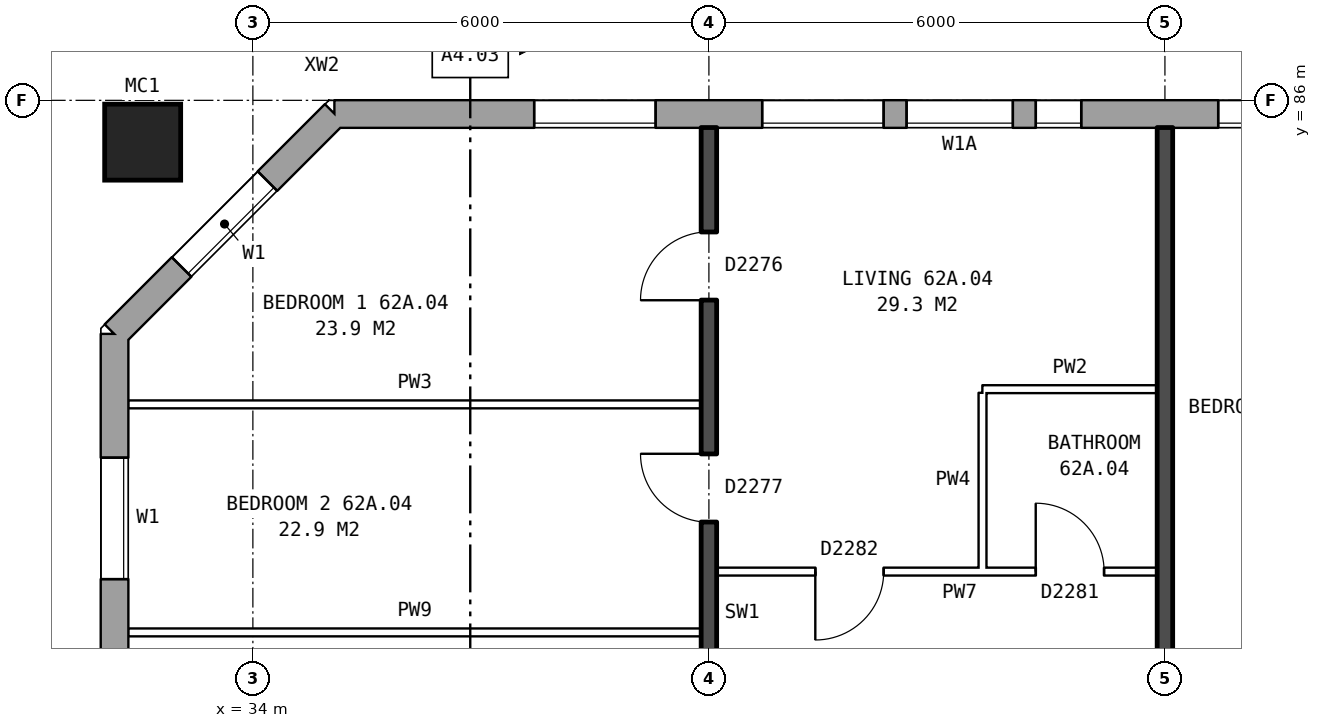
"""IFC4 building model, lengths in metres.
Left out: names, types, materials, properties, quantities, classifications, styles, units other than length and angle.
Written with IfcOpenShell. Run it as: python <this file> out.ifc"""

import sys

from ifc_helpers import new_model, si_unit, direction, frame, frame_2d, origin, origin_2d, place, context, subcontext, project, spatial, rectangle, hollow_rectangle, extrude, element, fill, save


model = new_model("IFC4")
c1 = context("Model", 3, precision=1e-05, world=origin(), true_north=direction((0.0, 1.0)))
c2 = subcontext(c1, "Body", "Model", "MODEL_VIEW")
j1 = project(units=[si_unit("LENGTHUNIT", "METRE"), si_unit("PLANEANGLEUNIT", "RADIAN")], contexts=[c1])
p1 = place(None, origin())
s1 = spatial("IfcSite", under=j1, at=p1, CompositionType="ELEMENT")
p2 = place(p1, origin())
s2 = spatial("IfcBuilding", under=s1, at=p2, CompositionType="ELEMENT")
p3 = place(p2, frame((0.0, 0.0, 221.4)))
s3 = spatial("IfcBuildingStorey", under=s2, at=p3, CompositionType="ELEMENT", Elevation=221.4)
p4 = place(p3, frame((32.55, 85.45, 0.0), z_axis=(0.0, 0.0, 1.0), x_axis=(1.0, 0.0, 0.0)))
e1 = element("IfcColumn", 1, at=p4, inside=s3, PredefinedType="COLUMN", context=c2, shape_type="SweptSolid", body=[
    extrude(hollow_rectangle(XDim=1.0, YDim=1.0, WallThickness=0.055, at=origin_2d()), origin(), (0.0, 0.0, 1.0), 3.1),
])
p5 = place(p3, frame((74.95, 85.82, 0.0), z_axis=(0.0, 0.0, 1.0), x_axis=(-1.0, 0.0, 0.0)))
e2 = element("IfcWall", 2, at=p5, inside=s3, PredefinedType="STANDARD", context=c2, shape_type="SweptSolid", body=[
    extrude(rectangle(XDim=39.875, YDim=0.36, at=frame_2d((19.938, 0.0))), origin(), (0.0, 0.0, 1.0), 2.85),
])
p6 = place(p5, frame((2.65, 0.0, 0.8)))
e3 = element("IfcOpeningElement", 3, at=p6, cuts=e2, PredefinedType="OPENING", context=c2, shape_type="SweptSolid", body=[
    extrude(rectangle(XDim=1.6, YDim=1.8, at=frame_2d((0.8, 0.9))), frame((0.0, 0.19, 0.0), z_axis=(0.0, -1.0, 0.0), x_axis=(1.0, 0.0, 0.0)), (0.0, 0.0, 1.0), 0.38),
])
p7 = place(p5, frame((5.65, 0.0, 0.8)))
e4 = element("IfcOpeningElement", 4, at=p7, cuts=e2, PredefinedType="OPENING", context=c2, shape_type="SweptSolid", body=[
    extrude(rectangle(XDim=1.6, YDim=1.8, at=frame_2d((0.8, 0.9))), frame((0.0, 0.19, 0.0), z_axis=(0.0, -1.0, 0.0), x_axis=(1.0, 0.0, 0.0)), (0.0, 0.0, 1.0), 0.38),
])
p8 = place(p5, frame((8.65, 0.0, 0.8)))
e5 = element("IfcOpeningElement", 5, at=p8, cuts=e2, PredefinedType="OPENING", context=c2, shape_type="SweptSolid", body=[
    extrude(rectangle(XDim=1.6, YDim=1.8, at=frame_2d((0.8, 0.9))), frame((0.0, 0.19, 0.0), z_axis=(0.0, -1.0, 0.0), x_axis=(1.0, 0.0, 0.0)), (0.0, 0.0, 1.0), 0.38),
])
p9 = place(p5, frame((11.15, 0.0, 1.55)))
e6 = element("IfcOpeningElement", 6, at=p9, cuts=e2, PredefinedType="OPENING", context=c2, shape_type="SweptSolid", body=[
    extrude(rectangle(XDim=0.6, YDim=0.9, at=frame_2d((0.3, 0.45))), frame((0.0, 0.19, 0.0), z_axis=(0.0, -1.0, 0.0), x_axis=(1.0, 0.0, 0.0)), (0.0, 0.0, 1.0), 0.38),
])
p10 = place(p5, frame((14.65, 0.0, 0.8)))
e7 = element("IfcOpeningElement", 7, at=p10, cuts=e2, PredefinedType="OPENING", context=c2, shape_type="SweptSolid", body=[
    extrude(rectangle(XDim=1.6, YDim=1.8, at=frame_2d((0.8, 0.9))), frame((0.0, 0.19, 0.0), z_axis=(0.0, -1.0, 0.0), x_axis=(1.0, 0.0, 0.0)), (0.0, 0.0, 1.0), 0.38),
])
p11 = place(p5, frame((17.65, 0.0, 0.8)))
e8 = element("IfcOpeningElement", 8, at=p11, cuts=e2, PredefinedType="OPENING", context=c2, shape_type="SweptSolid", body=[
    extrude(rectangle(XDim=1.6, YDim=1.8, at=frame_2d((0.8, 0.9))), frame((0.0, 0.19, 0.0), z_axis=(0.0, -1.0, 0.0), x_axis=(1.0, 0.0, 0.0)), (0.0, 0.0, 1.0), 0.38),
])
p12 = place(p5, frame((20.65, 0.0, 0.8)))
e9 = element("IfcOpeningElement", 9, at=p12, cuts=e2, PredefinedType="OPENING", context=c2, shape_type="SweptSolid", body=[
    extrude(rectangle(XDim=1.6, YDim=1.8, at=frame_2d((0.8, 0.9))), frame((0.0, 0.19, 0.0), z_axis=(0.0, -1.0, 0.0), x_axis=(1.0, 0.0, 0.0)), (0.0, 0.0, 1.0), 0.38),
])
p13 = place(p5, frame((23.65, 0.0, 0.8)))
e10 = element("IfcOpeningElement", 10, at=p13, cuts=e2, PredefinedType="OPENING", context=c2, shape_type="SweptSolid", body=[
    extrude(rectangle(XDim=1.6, YDim=1.8, at=frame_2d((0.8, 0.9))), frame((0.0, 0.19, 0.0), z_axis=(0.0, -1.0, 0.0), x_axis=(1.0, 0.0, 0.0)), (0.0, 0.0, 1.0), 0.38),
])
p14 = place(p5, frame((26.65, 0.0, 0.8)))
e11 = element("IfcOpeningElement", 11, at=p14, cuts=e2, PredefinedType="OPENING", context=c2, shape_type="SweptSolid", body=[
    extrude(rectangle(XDim=1.6, YDim=1.8, at=frame_2d((0.8, 0.9))), frame((0.0, 0.19, 0.0), z_axis=(0.0, -1.0, 0.0), x_axis=(1.0, 0.0, 0.0)), (0.0, 0.0, 1.0), 0.38),
])
p15 = place(p5, frame((30.05, 0.0, 1.7)))
e12 = element("IfcOpeningElement", 12, at=p15, cuts=e2, PredefinedType="OPENING", context=c2, shape_type="SweptSolid", body=[
    extrude(rectangle(XDim=0.6, YDim=0.9, at=frame_2d((0.3, 0.45))), frame((0.0, 0.19, 0.0), z_axis=(0.0, -1.0, 0.0), x_axis=(1.0, 0.0, 0.0)), (0.0, 0.0, 1.0), 0.38),
])
p16 = place(p5, frame((32.65, 0.0, 0.8)))
e13 = element("IfcOpeningElement", 13, at=p16, cuts=e2, PredefinedType="OPENING", context=c2, shape_type="SweptSolid", body=[
    extrude(rectangle(XDim=1.6, YDim=1.8, at=frame_2d((0.8, 0.9))), frame((0.0, 0.19, 0.0), z_axis=(0.0, -1.0, 0.0), x_axis=(1.0, 0.0, 0.0)), (0.0, 0.0, 1.0), 0.38),
])
p17 = place(p5, frame((35.65, 0.0, 0.8)))
e14 = element("IfcOpeningElement", 14, at=p17, cuts=e2, PredefinedType="OPENING", context=c2, shape_type="SweptSolid", body=[
    extrude(rectangle(XDim=1.6, YDim=1.8, at=frame_2d((0.8, 0.9))), frame((0.0, 0.19, 0.0), z_axis=(0.0, -1.0, 0.0), x_axis=(1.0, 0.0, 0.0)), (0.0, 0.0, 1.0), 0.38),
])
p18 = place(p5, frame((13.0, 0.0, 0.15)))
e15 = element("IfcOpeningElement", 15, at=p18, cuts=e2, PredefinedType="OPENING", context=c2, shape_type="SweptSolid", body=[
    extrude(rectangle(XDim=0.8, YDim=1.5, at=frame_2d((0.4, 0.75))), frame((0.0, 0.19, 0.0), z_axis=(0.0, -1.0, 0.0), x_axis=(1.0, 0.0, 0.0)), (0.0, 0.0, 1.0), 0.38),
])
p19 = place(p5, frame((30.95, 0.0, 0.8)))
e16 = element("IfcOpeningElement", 16, at=p19, cuts=e2, PredefinedType="OPENING", context=c2, shape_type="SweptSolid", body=[
    extrude(rectangle(XDim=1.4, YDim=1.8, at=frame_2d((0.7, 0.9))), frame((0.0, 0.19, 0.0), z_axis=(0.0, -1.0, 0.0), x_axis=(1.0, 0.0, 0.0)), (0.0, 0.0, 1.0), 0.38),
])
p20 = place(p3, frame((35.075, 85.82, 0.0), z_axis=(0.0, 0.0, 1.0), x_axis=(-0.707106781187, -0.707106781187, 0.0)))
e17 = element("IfcWall", 17, at=p20, inside=s3, PredefinedType="STANDARD", context=c2, shape_type="SweptSolid", body=[
    extrude(rectangle(XDim=4.094, YDim=0.36, at=frame_2d((2.047, 0.0))), origin(), (0.0, 0.0, 1.0), 2.85),
])
p21 = place(p20, frame((1.247, 0.0, 0.8)))
e18 = element("IfcOpeningElement", 18, at=p21, cuts=e17, PredefinedType="OPENING", context=c2, shape_type="SweptSolid", body=[
    extrude(rectangle(XDim=1.6, YDim=1.8, at=frame_2d((0.8, 0.9))), frame((0.0, 0.19, 0.0), z_axis=(0.0, -1.0, 0.0), x_axis=(1.0, 0.0, 0.0)), (0.0, 0.0, 1.0), 0.38),
])
p22 = place(p3, frame((32.18, 82.925, 0.0), z_axis=(0.0, 0.0, 1.0), x_axis=(0.0, -1.0, 0.0)))
e19 = element("IfcWall", 19, at=p22, inside=s3, PredefinedType="STANDARD", context=c2, shape_type="SweptSolid", body=[
    extrude(rectangle(XDim=25.851, YDim=0.36, at=frame_2d((12.925, 0.0))), origin(), (0.0, 0.0, 1.0), 2.85),
])
p23 = place(p22, frame((1.625, 0.0, 0.8)))
e20 = element("IfcOpeningElement", 20, at=p23, cuts=e19, PredefinedType="OPENING", context=c2, shape_type="SweptSolid", body=[
    extrude(rectangle(XDim=1.6, YDim=1.8, at=frame_2d((0.8, 0.9))), frame((0.0, 0.19, 0.0), z_axis=(0.0, -1.0, 0.0), x_axis=(1.0, 0.0, 0.0)), (0.0, 0.0, 1.0), 0.38),
])
p24 = place(p22, frame((4.625, 0.0, 0.8)))
e21 = element("IfcOpeningElement", 21, at=p24, cuts=e19, PredefinedType="OPENING", context=c2, shape_type="SweptSolid", body=[
    extrude(rectangle(XDim=1.6, YDim=1.8, at=frame_2d((0.8, 0.9))), frame((0.0, 0.19, 0.0), z_axis=(0.0, -1.0, 0.0), x_axis=(1.0, 0.0, 0.0)), (0.0, 0.0, 1.0), 0.38),
])
p25 = place(p22, frame((19.625, 0.0, 0.8)))
e22 = element("IfcOpeningElement", 22, at=p25, cuts=e19, PredefinedType="OPENING", context=c2, shape_type="SweptSolid", body=[
    extrude(rectangle(XDim=1.6, YDim=1.8, at=frame_2d((0.8, 0.9))), frame((0.0, 0.19, 0.0), z_axis=(0.0, -1.0, 0.0), x_axis=(1.0, 0.0, 0.0)), (0.0, 0.0, 1.0), 0.38),
])
p26 = place(p22, frame((22.625, 0.0, 0.8)))
e23 = element("IfcOpeningElement", 23, at=p26, cuts=e19, PredefinedType="OPENING", context=c2, shape_type="SweptSolid", body=[
    extrude(rectangle(XDim=1.6, YDim=1.8, at=frame_2d((0.8, 0.9))), frame((0.0, 0.19, 0.0), z_axis=(0.0, -1.0, 0.0), x_axis=(1.0, 0.0, 0.0)), (0.0, 0.0, 1.0), 0.38),
])
p27 = place(p3, frame((32.36, 79.0, 0.0), z_axis=(0.0, 0.0, 1.0), x_axis=(1.0, 0.0, 0.0)))
e24 = element("IfcWall", 24, at=p27, inside=s3, PredefinedType="PARTITIONING", context=c2, shape_type="SweptSolid", body=[
    extrude(rectangle(XDim=7.54, YDim=0.1, at=frame_2d((3.77, 0.0))), origin(), (0.0, 0.0, 1.0), 2.85),
])
p28 = place(p3, frame((40.1, 79.8, 0.0), z_axis=(0.0, 0.0, 1.0), x_axis=(1.0, 0.0, 0.0)))
e25 = element("IfcWall", 25, at=p28, inside=s3, PredefinedType="PARTITIONING", context=c2, shape_type="SweptSolid", body=[
    extrude(rectangle(XDim=5.8, YDim=0.1, at=frame_2d((2.9, 0.0))), origin(), (0.0, 0.0, 1.0), 2.85),
])
p29 = place(p28, frame((1.3, 0.0, 0.0)))
e26 = element("IfcOpeningElement", 26, at=p29, cuts=e25, PredefinedType="OPENING", context=c2, shape_type="SweptSolid", body=[
    extrude(rectangle(XDim=0.9, YDim=2.1, at=frame_2d((0.45, 1.05))), frame((0.0, 0.06, 0.0), z_axis=(0.0, -1.0, 0.0), x_axis=(1.0, 0.0, 0.0)), (0.0, 0.0, 1.0), 0.12),
])
p30 = place(p28, frame((4.2, 0.0, 0.0)))
e27 = element("IfcOpeningElement", 27, at=p30, cuts=e25, PredefinedType="OPENING", context=c2, shape_type="SweptSolid", body=[
    extrude(rectangle(XDim=0.9, YDim=2.1, at=frame_2d((0.45, 1.05))), frame((0.0, 0.06, 0.0), z_axis=(0.0, -1.0, 0.0), x_axis=(1.0, 0.0, 0.0)), (0.0, 0.0, 1.0), 0.12),
])
p31 = place(p3, frame((32.36, 82.0, 0.0), z_axis=(0.0, 0.0, 1.0), x_axis=(1.0, 0.0, 0.0)))
e28 = element("IfcWall", 28, at=p31, inside=s3, PredefinedType="PARTITIONING", context=c2, shape_type="SweptSolid", body=[
    extrude(rectangle(XDim=7.54, YDim=0.1, at=frame_2d((3.77, 0.0))), origin(), (0.0, 0.0, 1.0), 2.85),
])
p32 = place(p3, frame((43.6, 82.2, 0.0), z_axis=(0.0, 0.0, 1.0), x_axis=(1.0, 0.0, 0.0)))
e29 = element("IfcWall", 29, at=p32, inside=s3, PredefinedType="PARTITIONING", context=c2, shape_type="SweptSolid", body=[
    extrude(rectangle(XDim=2.3, YDim=0.1, at=frame_2d((1.15, 0.0))), origin(), (0.0, 0.0, 1.0), 2.85),
])
p33 = place(p3, frame((40.0, 76.2, 0.0), z_axis=(0.0, 0.0, 1.0), x_axis=(0.0, 1.0, 0.0)))
e30 = element("IfcWall", 30, at=p33, inside=s3, PredefinedType="SOLIDWALL", context=c2, shape_type="SweptSolid", body=[
    extrude(rectangle(XDim=9.44, YDim=0.2, at=frame_2d((4.72, 0.0))), origin(), (0.0, 0.0, 1.0), 2.85),
])
p34 = place(p33, frame((7.17, 0.0, 0.0)))
e31 = element("IfcOpeningElement", 31, at=p34, cuts=e30, PredefinedType="OPENING", context=c2, shape_type="SweptSolid", body=[
    extrude(rectangle(XDim=0.9, YDim=2.1, at=frame_2d((0.45, 1.05))), frame((0.0, 0.11, 0.0), z_axis=(0.0, -1.0, 0.0), x_axis=(1.0, 0.0, 0.0)), (0.0, 0.0, 1.0), 0.22),
])
p35 = place(p33, frame((4.25, 0.0, 0.0)))
e32 = element("IfcOpeningElement", 32, at=p35, cuts=e30, PredefinedType="OPENING", context=c2, shape_type="SweptSolid", body=[
    extrude(rectangle(XDim=0.9, YDim=2.1, at=frame_2d((0.45, 1.05))), frame((0.0, 0.11, 0.0), z_axis=(0.0, -1.0, 0.0), x_axis=(1.0, 0.0, 0.0)), (0.0, 0.0, 1.0), 0.22),
])
p36 = place(p33, frame((0.95, 0.0, 0.0)))
e33 = element("IfcOpeningElement", 33, at=p36, cuts=e30, PredefinedType="OPENING", context=c2, shape_type="SweptSolid", body=[
    extrude(rectangle(XDim=0.9, YDim=2.1, at=frame_2d((0.45, 1.05))), frame((0.0, 0.11, 0.0), z_axis=(0.0, -1.0, 0.0), x_axis=(1.0, 0.0, 0.0)), (0.0, 0.0, 1.0), 0.22),
])
p37 = place(p3, frame((43.6, 79.85, 0.0), z_axis=(0.0, 0.0, 1.0), x_axis=(0.0, 1.0, 0.0)))
e34 = element("IfcWall", 34, at=p37, inside=s3, PredefinedType="PARTITIONING", context=c2, shape_type="SweptSolid", body=[
    extrude(rectangle(XDim=2.3, YDim=0.1, at=frame_2d((1.15, 0.0))), origin(), (0.0, 0.0, 1.0), 2.85),
])
p38 = place(p3, frame((46.0, 71.2, 0.0), z_axis=(0.0, 0.0, 1.0), x_axis=(0.0, 1.0, 0.0)))
e35 = element("IfcWall", 35, at=p38, inside=s3, PredefinedType="SOLIDWALL", context=c2, shape_type="SweptSolid", body=[
    extrude(rectangle(XDim=14.44, YDim=0.2, at=frame_2d((7.22, 0.0))), origin(), (0.0, 0.0, 1.0), 2.85),
])
p39 = place(p14, origin())
e36 = element("IfcWindow", 36, at=p39, inside=s3, PartitioningType="SINGLE_PANEL", PredefinedType="WINDOW", context=c2, shape_type="SweptSolid", body=[
    extrude(rectangle(XDim=1.6, YDim=1.8, at=frame_2d((0.8, 0.9))), frame((0.0, 0.15, 0.0), z_axis=(0.0, -1.0, 0.0), x_axis=(1.0, 0.0, 0.0)), (0.0, 0.0, 1.0), 0.06),
])
fill(e11, e36)
p40 = place(p15, origin())
e37 = element("IfcWindow", 37, at=p40, inside=s3, PartitioningType="SINGLE_PANEL", PredefinedType="WINDOW", context=c2, shape_type="SweptSolid", body=[
    extrude(rectangle(XDim=0.6, YDim=0.9, at=frame_2d((0.3, 0.45))), frame((0.0, 0.15, 0.0), z_axis=(0.0, -1.0, 0.0), x_axis=(1.0, 0.0, 0.0)), (0.0, 0.0, 1.0), 0.06),
])
fill(e12, e37)
p41 = place(p16, origin())
e38 = element("IfcWindow", 38, at=p41, inside=s3, PartitioningType="SINGLE_PANEL", PredefinedType="WINDOW", context=c2, shape_type="SweptSolid", body=[
    extrude(rectangle(XDim=1.6, YDim=1.8, at=frame_2d((0.8, 0.9))), frame((0.0, 0.15, 0.0), z_axis=(0.0, -1.0, 0.0), x_axis=(1.0, 0.0, 0.0)), (0.0, 0.0, 1.0), 0.06),
])
fill(e13, e38)
p42 = place(p17, origin())
e39 = element("IfcWindow", 39, at=p42, inside=s3, PartitioningType="SINGLE_PANEL", PredefinedType="WINDOW", context=c2, shape_type="SweptSolid", body=[
    extrude(rectangle(XDim=1.6, YDim=1.8, at=frame_2d((0.8, 0.9))), frame((0.0, 0.15, 0.0), z_axis=(0.0, -1.0, 0.0), x_axis=(1.0, 0.0, 0.0)), (0.0, 0.0, 1.0), 0.06),
])
fill(e14, e39)
p43 = place(p21, origin())
e40 = element("IfcWindow", 40, at=p43, inside=s3, PartitioningType="SINGLE_PANEL", PredefinedType="WINDOW", context=c2, shape_type="SweptSolid", body=[
    extrude(rectangle(XDim=1.6, YDim=1.8, at=frame_2d((0.8, 0.9))), frame((0.0, 0.15, 0.0), z_axis=(0.0, -1.0, 0.0), x_axis=(1.0, 0.0, 0.0)), (0.0, 0.0, 1.0), 0.06),
])
fill(e18, e40)
p44 = place(p23, origin())
e41 = element("IfcWindow", 41, at=p44, inside=s3, PartitioningType="SINGLE_PANEL", PredefinedType="WINDOW", context=c2, shape_type="SweptSolid", body=[
    extrude(rectangle(XDim=1.6, YDim=1.8, at=frame_2d((0.8, 0.9))), frame((0.0, 0.15, 0.0), z_axis=(0.0, -1.0, 0.0), x_axis=(1.0, 0.0, 0.0)), (0.0, 0.0, 1.0), 0.06),
])
fill(e20, e41)
p45 = place(p34, origin())
e42 = element("IfcDoor", 42, at=p45, inside=s3, OperationType="SINGLE_SWING_LEFT", PredefinedType="DOOR", context=c2, shape_type="SweptSolid", body=[
    extrude(rectangle(XDim=0.9, YDim=2.1, at=frame_2d((0.45, 1.05))), frame((0.0, 0.025, 0.0), z_axis=(0.0, -1.0, 0.0), x_axis=(1.0, 0.0, 0.0)), (0.0, 0.0, 1.0), 0.05),
])
fill(e31, e42)
p46 = place(p35, origin())
e43 = element("IfcDoor", 43, at=p46, inside=s3, OperationType="SINGLE_SWING_RIGHT", PredefinedType="DOOR", context=c2, shape_type="SweptSolid", body=[
    extrude(rectangle(XDim=0.9, YDim=2.1, at=frame_2d((0.45, 1.05))), frame((0.0, 0.025, 0.0), z_axis=(0.0, -1.0, 0.0), x_axis=(1.0, 0.0, 0.0)), (0.0, 0.0, 1.0), 0.05),
])
fill(e32, e43)
p47 = place(p29, frame((0.9, 0.0, 0.0), z_axis=(0.0, 0.0, 1.0), x_axis=(-1.0, 0.0, 0.0)))
e44 = element("IfcDoor", 44, at=p47, inside=s3, OperationType="SINGLE_SWING_RIGHT", PredefinedType="DOOR", context=c2, shape_type="SweptSolid", body=[
    extrude(rectangle(XDim=0.9, YDim=2.1, at=frame_2d((0.45, 1.05))), frame((0.0, 0.025, 0.0), z_axis=(0.0, -1.0, 0.0), x_axis=(1.0, 0.0, 0.0)), (0.0, 0.0, 1.0), 0.05),
])
fill(e26, e44)
p48 = place(p30, origin())
e45 = element("IfcDoor", 45, at=p48, inside=s3, OperationType="SINGLE_SWING_LEFT", PredefinedType="DOOR", context=c2, shape_type="SweptSolid", body=[
    extrude(rectangle(XDim=0.9, YDim=2.1, at=frame_2d((0.45, 1.05))), frame((0.0, 0.025, 0.0), z_axis=(0.0, -1.0, 0.0), x_axis=(1.0, 0.0, 0.0)), (0.0, 0.0, 1.0), 0.05),
])
fill(e27, e45)
p49 = place(p19, origin())
e46 = element("IfcWindow", 46, at=p49, inside=s3, PartitioningType="SINGLE_PANEL", PredefinedType="WINDOW", context=c2, shape_type="SweptSolid", body=[
    extrude(rectangle(XDim=1.4, YDim=1.8, at=frame_2d((0.7, 0.9))), frame((0.0, 0.15, 0.0), z_axis=(0.0, -1.0, 0.0), x_axis=(1.0, 0.0, 0.0)), (0.0, 0.0, 1.0), 0.06),
])
fill(e16, e46)
save(model, sys.argv[1])
